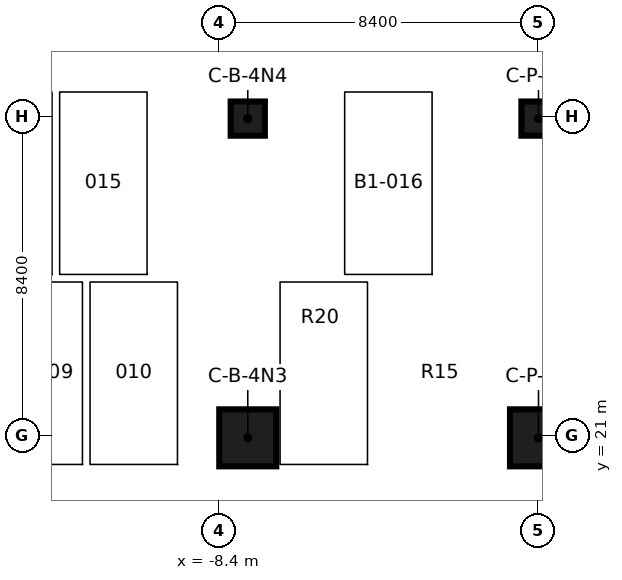
"""IFC4 building model, lengths in metres.
Left out: names, types, materials, properties, quantities, classifications, styles, units other than length and angle.
Written with IfcOpenShell. Run it as: python <this file> out.ifc"""

import sys

from ifc_helpers import new_model, si_unit, direction, frame, origin, origin_2d, place, context, subcontext, project, spatial, rectangle, extrude, element, save


model = new_model("IFC4")
c1 = context("Model", 3, precision=1e-05, world=origin(), true_north=direction((0.0, 1.0)))
c2 = subcontext(c1, "Body", "Model", "MODEL_VIEW")
j1 = project(units=[si_unit("LENGTHUNIT", "METRE"), si_unit("PLANEANGLEUNIT", "RADIAN")], contexts=[c1])
p1 = place(None, origin())
s1 = spatial("IfcSite", under=j1, at=p1, CompositionType="ELEMENT")
p2 = place(p1, origin())
s2 = spatial("IfcBuilding", under=s1, at=p2, CompositionType="ELEMENT")
p3 = place(p2, frame((0.0, 0.0, -5.0)))
s3 = spatial("IfcBuildingStorey", under=s2, at=p3, CompositionType="ELEMENT", Elevation=-5.0)
p4 = place(p3, frame((-7.65, 21.0, 0.0), z_axis=(0.0, 0.0, 1.0), x_axis=(1.0, 0.0, 0.0)))
e1 = element("IfcColumn", 1, at=p4, inside=s3, PredefinedType="COLUMN", context=c2, shape_type="SweptSolid", body=[
    extrude(rectangle(XDim=1.5, YDim=1.5, at=origin_2d()), origin(), (0.0, 0.0, 1.0), 4.6),
])
p5 = place(p3, frame((-7.65, 29.4, 0.0), z_axis=(0.0, 0.0, 1.0), x_axis=(1.0, 0.0, 0.0)))
e2 = element("IfcColumn", 2, at=p5, inside=s3, PredefinedType="COLUMN", context=c2, shape_type="SweptSolid", body=[
    extrude(rectangle(XDim=0.9, YDim=0.9, at=origin_2d()), origin(), (0.0, 0.0, 1.0), 4.6),
])
p6 = place(p3, frame((0.0, 21.0, 0.0), z_axis=(0.0, 0.0, 1.0), x_axis=(1.0, 0.0, 0.0)))
e3 = element("IfcColumn", 3, at=p6, inside=s3, PredefinedType="COLUMN", context=c2, shape_type="SweptSolid", body=[
    extrude(rectangle(XDim=1.5, YDim=1.5, at=origin_2d()), origin(), (0.0, 0.0, 1.0), 4.6),
])
p7 = place(p3, frame((0.0, 29.4, 0.0), z_axis=(0.0, 0.0, 1.0), x_axis=(1.0, 0.0, 0.0)))
e4 = element("IfcColumn", 4, at=p7, inside=s3, PredefinedType="COLUMN", context=c2, shape_type="SweptSolid", body=[
    extrude(rectangle(XDim=0.9, YDim=0.9, at=origin_2d()), origin(), (0.0, 0.0, 1.0), 4.6),
])
save(model, sys.argv[1])
